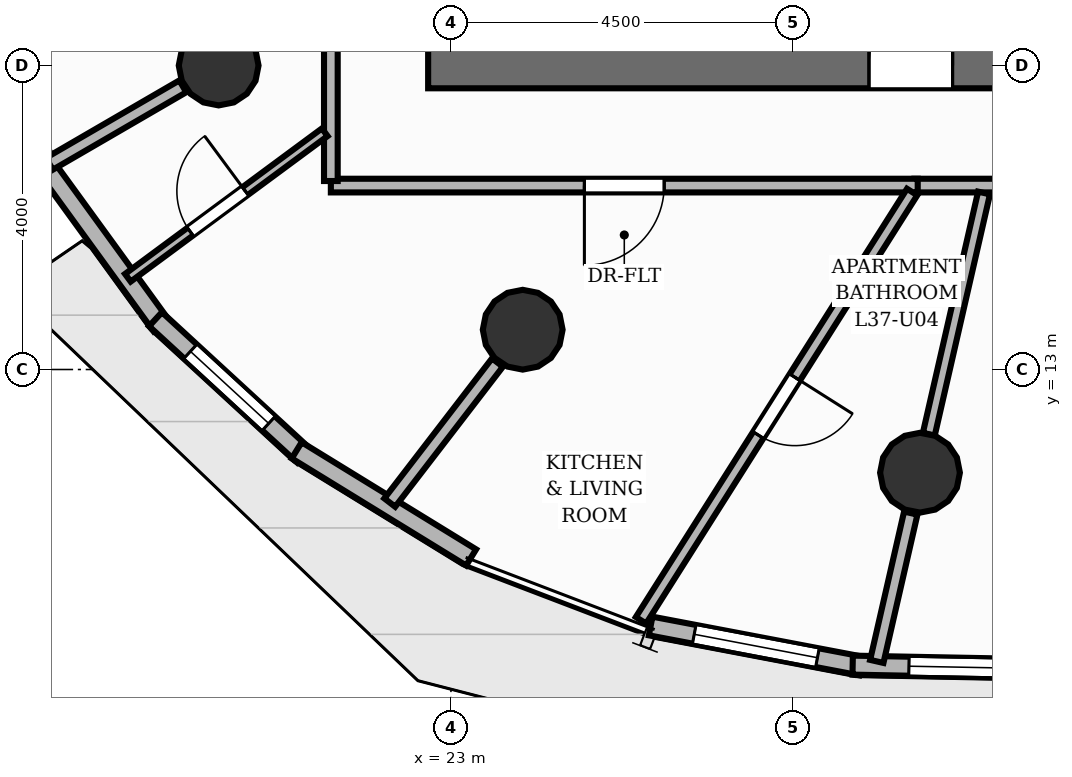
"""IFC4 building model, lengths in metres.
Left out: names, types, materials, properties, quantities, classifications, styles, units other than length and angle.
Written with IfcOpenShell. Run it as: python <this file> out.ifc"""

import sys

from ifc_helpers import new_model, si_unit, direction, frame, frame_2d, origin, origin_2d, place, context, subcontext, project, spatial, rectangle, circle, extrude, element, fill, save


model = new_model("IFC4")
c1 = context("Model", 3, precision=1e-05, world=origin(), true_north=direction((0.0, 1.0)))
c2 = subcontext(c1, "Body", "Model", "MODEL_VIEW")
j1 = project(units=[si_unit("LENGTHUNIT", "METRE"), si_unit("PLANEANGLEUNIT", "RADIAN")], contexts=[c1])
p1 = place(None, origin())
s1 = spatial("IfcSite", under=j1, at=p1, CompositionType="ELEMENT")
p2 = place(p1, origin())
s2 = spatial("IfcBuilding", under=s1, at=p2, CompositionType="ELEMENT")
p3 = place(p2, frame((0.0, 0.0, 126.56)))
s3 = spatial("IfcBuildingStorey", under=s2, at=p3, CompositionType="ELEMENT", Elevation=126.56)
p4 = place(p3, frame((22.7, 17.0, 0.0), z_axis=(0.0, 0.0, 1.0), x_axis=(1.0, 0.0, 0.0)))
e1 = element("IfcWall", 1, at=p4, inside=s3, PredefinedType="SHEAR", context=c2, shape_type="SweptSolid", body=[
    extrude(rectangle(XDim=15.1, YDim=0.6, at=frame_2d((7.55, 0.0))), origin(), (0.0, 0.0, 1.0), 3.2),
])
p5 = place(p4, frame((5.8, 0.0, 0.0)))
e2 = element("IfcOpeningElement", 2, at=p5, cuts=e1, PredefinedType="OPENING", context=c2, shape_type="SweptSolid", body=[
    extrude(rectangle(XDim=1.1, YDim=2.15, at=frame_2d((0.55, 1.075))), frame((0.0, 0.31, 0.0), z_axis=(0.0, -1.0, 0.0), x_axis=(1.0, 0.0, 0.0)), (0.0, 0.0, 1.0), 0.62),
])
p6 = place(p4, frame((9.35, 0.0, 0.0)))
e3 = element("IfcOpeningElement", 3, at=p6, cuts=e1, PredefinedType="OPENING", context=c2, shape_type="SweptSolid", body=[
    extrude(rectangle(XDim=0.9, YDim=2.1, at=frame_2d((0.45, 1.05))), frame((0.0, 0.31, 0.0), z_axis=(0.0, -1.0, 0.0), x_axis=(1.0, 0.0, 0.0)), (0.0, 0.0, 1.0), 0.62),
])
for number, where, z_axis, x_axis in (
    (4, (19.944, 17.0, 0.0), (0.0, 0.0, 1.0), (1.0, 0.0, 0.0)),
    (5, (23.944, 13.523, 0.0), (0.0, 0.0, 1.0), (1.0, 0.0, 0.0)),
    (6, (29.171, 11.642, 0.0), (0.0, 0.0, 1.0), (1.0, 0.0, 0.0)),
):
    element("IfcColumn", number, at=place(p3, frame(where, z_axis=z_axis, x_axis=x_axis)), inside=s3, PredefinedType="COLUMN", context=c2, shape_type="SweptSolid", body=[
        extrude(circle(Radius=0.525, at=origin_2d()), origin(), (0.0, 0.0, 1.0), 3.2),
    ])
p7 = place(p3, frame((17.705, 15.6, 0.0), z_axis=(0.0, 0.0, 1.0), x_axis=(-0.41458087789, 0.910012470073, 0.0)))
e7 = element("IfcWall", 7, at=p7, inside=s3, PredefinedType="SOLIDWALL", context=c2, shape_type="SweptSolid", body=[
    extrude(rectangle(XDim=2.624, YDim=0.25, at=frame_2d((1.312, 0.0))), origin(), (0.0, 0.0, 1.0), 2.96),
])
p8 = place(p7, frame((0.612, 0.0, 0.85)))
e8 = element("IfcOpeningElement", 8, at=p8, cuts=e7, PredefinedType="OPENING", context=c2, shape_type="SweptSolid", body=[
    extrude(rectangle(XDim=1.4, YDim=1.55, at=frame_2d((0.7, 0.775))), frame((0.0, 0.135, 0.0), z_axis=(0.0, -1.0, 0.0), x_axis=(1.0, 0.0, 0.0)), (0.0, 0.0, 1.0), 0.27),
])
p9 = place(p3, frame((19.189, 13.576, 0.0), z_axis=(0.0, 0.0, 1.0), x_axis=(-0.587574137145, 0.80917033643, 0.0)))
e9 = element("IfcWall", 9, at=p9, inside=s3, PredefinedType="SOLIDWALL", context=c2, shape_type="SweptSolid", body=[
    extrude(rectangle(XDim=2.624, YDim=0.25, at=frame_2d((1.312, 0.0))), origin(), (0.0, 0.0, 1.0), 2.96),
])
p10 = place(p3, frame((21.061, 11.868, 0.0), z_axis=(0.0, 0.0, 1.0), x_axis=(-0.73572884951, 0.677276206579, 0.0)))
e10 = element("IfcWall", 10, at=p10, inside=s3, PredefinedType="SOLIDWALL", context=c2, shape_type="SweptSolid", body=[
    extrude(rectangle(XDim=2.648, YDim=0.25, at=frame_2d((1.324, 0.0))), origin(), (0.0, 0.0, 1.0), 2.96),
])
p11 = place(p10, frame((0.624, 0.0, 0.85)))
e11 = element("IfcOpeningElement", 11, at=p11, cuts=e10, PredefinedType="OPENING", context=c2, shape_type="SweptSolid", body=[
    extrude(rectangle(XDim=1.4, YDim=1.55, at=frame_2d((0.7, 0.775))), frame((0.0, 0.135, 0.0), z_axis=(0.0, -1.0, 0.0), x_axis=(1.0, 0.0, 0.0)), (0.0, 0.0, 1.0), 0.27),
])
p12 = place(p3, frame((23.265, 10.527, 0.0), z_axis=(0.0, 0.0, 1.0), x_axis=(-0.852103133134, 0.523373910797, 0.0)))
e12 = element("IfcWall", 12, at=p12, inside=s3, PredefinedType="SOLIDWALL", context=c2, shape_type="SweptSolid", body=[
    extrude(rectangle(XDim=2.693, YDim=0.25, at=frame_2d((1.346, 0.0))), origin(), (0.0, 0.0, 1.0), 2.96),
])
p13 = place(p3, frame((28.396, 9.099, 0.0), z_axis=(0.0, 0.0, 1.0), x_axis=(-0.982412055756, 0.18672587583, 0.0)))
e13 = element("IfcWall", 13, at=p13, inside=s3, PredefinedType="SOLIDWALL", context=c2, shape_type="SweptSolid", body=[
    extrude(rectangle(XDim=2.818, YDim=0.25, at=frame_2d((1.409, 0.0))), origin(), (0.0, 0.0, 1.0), 2.96),
])
p14 = place(p13, frame((0.584, 0.0, 0.85)))
e14 = element("IfcOpeningElement", 14, at=p14, cuts=e13, PredefinedType="OPENING", context=c2, shape_type="SweptSolid", body=[
    extrude(rectangle(XDim=1.65, YDim=1.55, at=frame_2d((0.825, 0.775))), frame((0.0, 0.135, 0.0), z_axis=(0.0, -1.0, 0.0), x_axis=(1.0, 0.0, 0.0)), (0.0, 0.0, 1.0), 0.27),
])
p15 = place(p3, frame((31.167, 9.055, 0.0), z_axis=(0.0, 0.0, 1.0), x_axis=(-0.99981990109, 0.018978023714, 0.0)))
e15 = element("IfcWall", 15, at=p15, inside=s3, PredefinedType="SOLIDWALL", context=c2, shape_type="SweptSolid", body=[
    extrude(rectangle(XDim=2.882, YDim=0.25, at=frame_2d((1.441, 0.0))), origin(), (0.0, 0.0, 1.0), 2.96),
])
p16 = place(p15, frame((0.741, 0.0, 0.85)))
e16 = element("IfcOpeningElement", 16, at=p16, cuts=e15, PredefinedType="OPENING", context=c2, shape_type="SweptSolid", body=[
    extrude(rectangle(XDim=1.4, YDim=1.55, at=frame_2d((0.7, 0.775))), frame((0.0, 0.135, 0.0), z_axis=(0.0, -1.0, 0.0), x_axis=(1.0, 0.0, 0.0)), (0.0, 0.0, 1.0), 0.27),
])
p17 = place(p3, frame((19.472, 16.726, 0.0), z_axis=(0.0, 0.0, 1.0), x_axis=(-0.86481084581, -0.502097800203, 0.0)))
e17 = element("IfcWall", 17, at=p17, inside=s3, PredefinedType="PARTITIONING", context=c2, shape_type="SweptSolid", body=[
    extrude(rectangle(XDim=2.03, YDim=0.18, at=frame_2d((1.015, 0.0))), origin(), (0.0, 0.0, 1.0), 2.336),
])
p18 = place(p3, frame((23.612, 13.092, 0.0), z_axis=(0.0, 0.0, 1.0), x_axis=(-0.609553382458, -0.792745024541, 0.0)))
e18 = element("IfcWall", 18, at=p18, inside=s3, PredefinedType="PARTITIONING", context=c2, shape_type="SweptSolid", body=[
    extrude(rectangle(XDim=2.324, YDim=0.18, at=frame_2d((1.162, 0.0))), origin(), (0.0, 0.0, 1.0), 2.336),
])
p19 = place(p3, frame((29.05, 11.111, 0.0), z_axis=(0.0, 0.0, 1.0), x_axis=(-0.2231492674, -0.974784286116, 0.0)))
e19 = element("IfcWall", 19, at=p19, inside=s3, PredefinedType="PARTITIONING", context=c2, shape_type="SweptSolid", body=[
    extrude(rectangle(XDim=2.002, YDim=0.18, at=frame_2d((1.001, 0.0))), origin(), (0.0, 0.0, 1.0), 2.336),
])
p20 = place(p3, frame((39.02, 15.42, 0.0), z_axis=(0.0, 0.0, 1.0), x_axis=(-1.0, 0.0, 0.0)))
e20 = element("IfcWall", 20, at=p20, inside=s3, PredefinedType="PARTITIONING", context=c2, shape_type="SweptSolid", body=[
    extrude(rectangle(XDim=9.922, YDim=0.18, at=frame_2d((4.961, 0.0))), origin(), (0.0, 0.0, 1.0), 2.955),
])
p21 = place(p20, frame((3.487, 0.0, 0.0)))
e21 = element("IfcOpeningElement", 21, at=p21, cuts=e20, PredefinedType="OPENING", context=c2, shape_type="SweptSolid", body=[
    extrude(rectangle(XDim=0.9, YDim=2.1, at=frame_2d((0.45, 1.05))), frame((0.0, 0.1, 0.0), z_axis=(0.0, -1.0, 0.0), x_axis=(1.0, 0.0, 0.0)), (0.0, 0.0, 1.0), 0.2),
])
p22 = place(p20, frame((6.571, 0.0, 0.0)))
e22 = element("IfcOpeningElement", 22, at=p22, cuts=e20, PredefinedType="OPENING", context=c2, shape_type="SweptSolid", body=[
    extrude(rectangle(XDim=0.9, YDim=2.1, at=frame_2d((0.45, 1.05))), frame((0.0, 0.1, 0.0), z_axis=(0.0, -1.0, 0.0), x_axis=(1.0, 0.0, 0.0)), (0.0, 0.0, 1.0), 0.2),
])
p23 = place(p3, frame((29.141, 15.42, 0.0), z_axis=(0.0, 0.0, 1.0), x_axis=(-1.0, 0.0, 0.0)))
e23 = element("IfcWall", 23, at=p23, inside=s3, PredefinedType="PARTITIONING", context=c2, shape_type="SweptSolid", body=[
    extrude(rectangle(XDim=7.721, YDim=0.18, at=frame_2d((3.861, 0.0))), origin(), (0.0, 0.0, 1.0), 2.955),
])
p24 = place(p23, frame((3.336, 0.0, 0.0)))
e24 = element("IfcOpeningElement", 24, at=p24, cuts=e23, PredefinedType="OPENING", context=c2, shape_type="SweptSolid", body=[
    extrude(rectangle(XDim=1.05, YDim=2.15, at=frame_2d((0.525, 1.075))), frame((0.0, 0.1, 0.0), z_axis=(0.0, -1.0, 0.0), x_axis=(1.0, 0.0, 0.0)), (0.0, 0.0, 1.0), 0.2),
])
p25 = place(p3, frame((21.42, 15.48, 0.0), z_axis=(0.0, 0.0, 1.0), x_axis=(0.0, 1.0, 0.0)))
e25 = element("IfcWall", 25, at=p25, inside=s3, PredefinedType="PARTITIONING", context=c2, shape_type="SweptSolid", body=[
    extrude(rectangle(XDim=6.12, YDim=0.18, at=frame_2d((3.06, 0.0))), origin(), (0.0, 0.0, 1.0), 2.955),
])
p26 = place(p3, frame((29.287, 12.149, 0.0), z_axis=(0.0, 0.0, 1.0), x_axis=(0.223166862669, 0.97478025801, 0.0)))
e26 = element("IfcWall", 26, at=p26, inside=s3, PredefinedType="PLUMBINGWALL", context=c2, shape_type="SweptSolid", body=[
    extrude(rectangle(XDim=3.256, YDim=0.16, at=frame_2d((1.628, 0.0))), origin(), (0.0, 0.0, 1.0), 2.336),
])
p27 = place(p3, frame((29.068, 15.335, 0.0), z_axis=(0.0, 0.0, 1.0), x_axis=(-0.534879638081, -0.844928264864, 0.0)))
e27 = element("IfcWall", 27, at=p27, inside=s3, PredefinedType="PLUMBINGWALL", context=c2, shape_type="SweptSolid", body=[
    extrude(rectangle(XDim=6.669, YDim=0.16, at=frame_2d((3.335, 0.0))), origin(), (0.0, 0.0, 1.0), 2.692),
])
p28 = place(p27, frame((2.885, 0.0, 0.0)))
e28 = element("IfcOpeningElement", 28, at=p28, cuts=e27, PredefinedType="OPENING", context=c2, shape_type="SweptSolid", body=[
    extrude(rectangle(XDim=0.9, YDim=2.1, at=frame_2d((0.45, 1.05))), frame((0.0, 0.09, 0.0), z_axis=(0.0, -1.0, 0.0), x_axis=(1.0, 0.0, 0.0)), (0.0, 0.0, 1.0), 0.18),
])
p29 = place(p3, frame((18.749, 14.207, 0.0), z_axis=(0.0, 0.0, 1.0), x_axis=(0.804182442208, 0.594382536456, 0.0)))
e29 = element("IfcWall", 29, at=p29, inside=s3, PredefinedType="PARTITIONING", context=c2, shape_type="SweptSolid", body=[
    extrude(rectangle(XDim=3.221, YDim=0.125, at=frame_2d((1.611, 0.0))), origin(), (0.0, 0.0, 1.0), 2.955),
])
p30 = place(p29, frame((1.021, 0.0, 0.0)))
e30 = element("IfcOpeningElement", 30, at=p30, cuts=e29, PredefinedType="OPENING", context=c2, shape_type="SweptSolid", body=[
    extrude(rectangle(XDim=0.9, YDim=2.1, at=frame_2d((0.45, 1.05))), frame((0.0, 0.073, 0.0), z_axis=(0.0, -1.0, 0.0), x_axis=(1.0, 0.0, 0.0)), (0.0, 0.0, 1.0), 0.145),
])
p31 = place(p11, origin())
e31 = element("IfcWindow", 31, at=p31, inside=s3, PartitioningType="SINGLE_PANEL", PredefinedType="WINDOW", context=c2, shape_type="SweptSolid", body=[
    extrude(rectangle(XDim=1.4, YDim=1.55, at=frame_2d((0.7, 0.775))), frame((0.0, 0.03, 0.0), z_axis=(0.0, -1.0, 0.0), x_axis=(1.0, 0.0, 0.0)), (0.0, 0.0, 1.0), 0.06),
])
fill(e11, e31)
p32 = place(p14, origin())
e32 = element("IfcWindow", 32, at=p32, inside=s3, PartitioningType="SINGLE_PANEL", PredefinedType="WINDOW", context=c2, shape_type="SweptSolid", body=[
    extrude(rectangle(XDim=1.65, YDim=1.55, at=frame_2d((0.825, 0.775))), frame((0.0, 0.03, 0.0), z_axis=(0.0, -1.0, 0.0), x_axis=(1.0, 0.0, 0.0)), (0.0, 0.0, 1.0), 0.06),
])
fill(e14, e32)
p33 = place(p16, origin())
e33 = element("IfcWindow", 33, at=p33, inside=s3, PartitioningType="SINGLE_PANEL", PredefinedType="WINDOW", context=c2, shape_type="SweptSolid", body=[
    extrude(rectangle(XDim=1.4, YDim=1.55, at=frame_2d((0.7, 0.775))), frame((0.0, 0.03, 0.0), z_axis=(0.0, -1.0, 0.0), x_axis=(1.0, 0.0, 0.0)), (0.0, 0.0, 1.0), 0.06),
])
fill(e16, e33)
p34 = place(p5, origin())
e34 = element("IfcDoor", 34, at=p34, inside=s3, OperationType="SINGLE_SWING_RIGHT", PredefinedType="DOOR", context=c2, shape_type="SweptSolid", body=[
    extrude(rectangle(XDim=1.1, YDim=2.15, at=frame_2d((0.55, 1.075))), frame((0.0, 0.025, 0.0), z_axis=(0.0, -1.0, 0.0), x_axis=(1.0, 0.0, 0.0)), (0.0, 0.0, 1.0), 0.05),
])
fill(e2, e34)
p35 = place(p24, origin())
e35 = element("IfcDoor", 35, at=p35, inside=s3, OperationType="SINGLE_SWING_RIGHT", PredefinedType="DOOR", context=c2, shape_type="SweptSolid", body=[
    extrude(rectangle(XDim=1.05, YDim=2.15, at=frame_2d((0.525, 1.075))), frame((0.0, 0.025, 0.0), z_axis=(0.0, -1.0, 0.0), x_axis=(1.0, 0.0, 0.0)), (0.0, 0.0, 1.0), 0.05),
])
fill(e24, e35)
p36 = place(p28, origin())
e36 = element("IfcDoor", 36, at=p36, inside=s3, OperationType="SINGLE_SWING_LEFT", PredefinedType="DOOR", context=c2, shape_type="SweptSolid", body=[
    extrude(rectangle(XDim=0.9, YDim=2.1, at=frame_2d((0.45, 1.05))), frame((0.0, 0.025, 0.0), z_axis=(0.0, -1.0, 0.0), x_axis=(1.0, 0.0, 0.0)), (0.0, 0.0, 1.0), 0.05),
])
fill(e28, e36)
p37 = place(p30, origin())
e37 = element("IfcDoor", 37, at=p37, inside=s3, OperationType="SINGLE_SWING_RIGHT", PredefinedType="DOOR", context=c2, shape_type="SweptSolid", body=[
    extrude(rectangle(XDim=0.9, YDim=2.1, at=frame_2d((0.45, 1.05))), frame((0.0, 0.025, 0.0), z_axis=(0.0, -1.0, 0.0), x_axis=(1.0, 0.0, 0.0)), (0.0, 0.0, 1.0), 0.05),
])
fill(e30, e37)
save(model, sys.argv[1])
